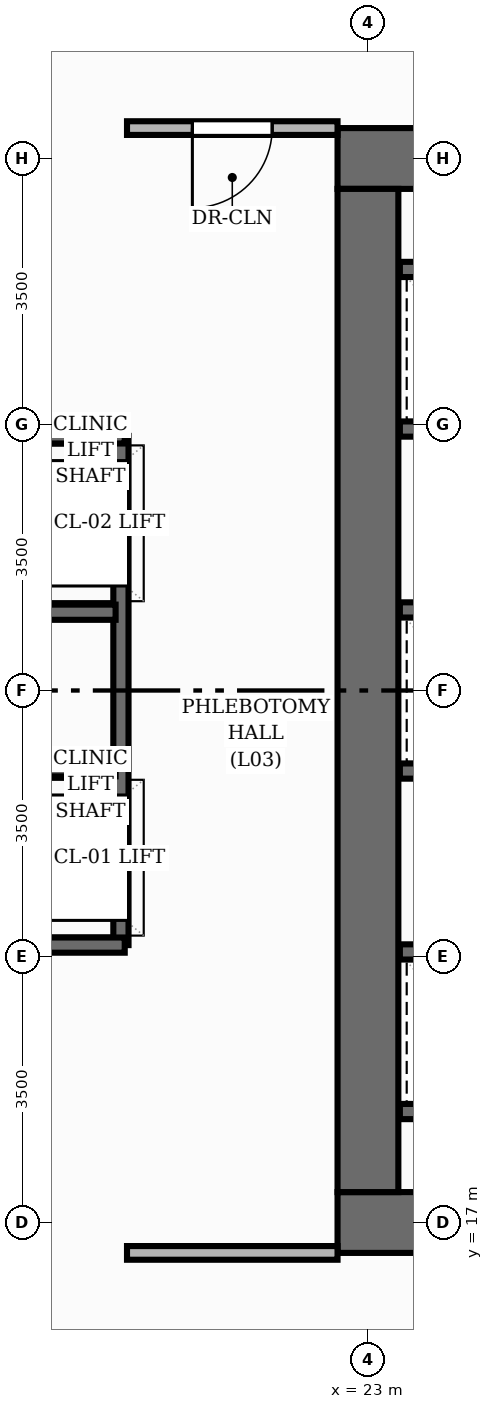
"""IFC4 building model, lengths in metres.
Left out: names, types, materials, properties, quantities, classifications, styles, units other than length and angle.
Written with IfcOpenShell. Run it as: python <this file> out.ifc"""

import sys

from ifc_helpers import new_model, si_unit, direction, frame, frame_2d, origin, place, context, subcontext, project, spatial, rectangle, extrude, element, fill, save


model = new_model("IFC4")
c1 = context("Model", 3, precision=1e-05, world=origin(), true_north=direction((0.0, 1.0)))
c2 = subcontext(c1, "Body", "Model", "MODEL_VIEW")
j1 = project(units=[si_unit("LENGTHUNIT", "METRE"), si_unit("PLANEANGLEUNIT", "RADIAN")], contexts=[c1])
p1 = place(None, origin())
s1 = spatial("IfcSite", under=j1, at=p1, CompositionType="ELEMENT")
p2 = place(p1, origin())
s2 = spatial("IfcBuilding", under=s1, at=p2, CompositionType="ELEMENT")
p3 = place(p2, frame((0.0, 0.0, 12.0)))
s3 = spatial("IfcBuildingStorey", under=s2, at=p3, CompositionType="ELEMENT", Elevation=12.0)
p4 = place(p3, frame((22.6, 17.0, 0.0), z_axis=(0.0, 0.0, 1.0), x_axis=(1.0, 0.0, 0.0)))
e1 = element("IfcWall", 1, at=p4, inside=s3, PredefinedType="SHEAR", context=c2, shape_type="SweptSolid", body=[
    extrude(rectangle(XDim=18.8, YDim=0.8, at=frame_2d((9.4, 0.0))), origin(), (0.0, 0.0, 1.0), 4.0),
])
p5 = place(p4, frame((5.9, 0.0, 0.0)))
e2 = element("IfcOpeningElement", 2, at=p5, cuts=e1, PredefinedType="OPENING", context=c2, shape_type="SweptSolid", body=[
    extrude(rectangle(XDim=1.1, YDim=2.15, at=frame_2d((0.55, 1.075))), frame((0.0, 0.41, 0.0), z_axis=(0.0, -1.0, 0.0), x_axis=(1.0, 0.0, 0.0)), (0.0, 0.0, 1.0), 0.82),
])
p6 = place(p4, frame((9.45, 0.0, 0.0)))
e3 = element("IfcOpeningElement", 3, at=p6, cuts=e1, PredefinedType="OPENING", context=c2, shape_type="SweptSolid", body=[
    extrude(rectangle(XDim=0.9, YDim=2.1, at=frame_2d((0.45, 1.05))), frame((0.0, 0.41, 0.0), z_axis=(0.0, -1.0, 0.0), x_axis=(1.0, 0.0, 0.0)), (0.0, 0.0, 1.0), 0.82),
])
p7 = place(p3, frame((22.6, 31.0, 0.0), z_axis=(0.0, 0.0, 1.0), x_axis=(1.0, 0.0, 0.0)))
e4 = element("IfcWall", 4, at=p7, inside=s3, PredefinedType="SHEAR", context=c2, shape_type="SweptSolid", body=[
    extrude(rectangle(XDim=18.8, YDim=0.8, at=frame_2d((9.4, 0.0))), origin(), (0.0, 0.0, 1.0), 4.0),
])
p8 = place(p7, frame((11.8, 0.0, 0.0)))
e5 = element("IfcOpeningElement", 5, at=p8, cuts=e4, PredefinedType="OPENING", context=c2, shape_type="SweptSolid", body=[
    extrude(rectangle(XDim=1.1, YDim=2.15, at=frame_2d((0.55, 1.075))), frame((0.0, 0.41, 0.0), z_axis=(0.0, -1.0, 0.0), x_axis=(1.0, 0.0, 0.0)), (0.0, 0.0, 1.0), 0.82),
])
p9 = place(p3, frame((23.0, 17.4, 0.0), z_axis=(0.0, 0.0, 1.0), x_axis=(0.0, 1.0, 0.0)))
e6 = element("IfcWall", 6, at=p9, inside=s3, PredefinedType="SHEAR", context=c2, shape_type="SweptSolid", body=[
    extrude(rectangle(XDim=13.2, YDim=0.8, at=frame_2d((6.6, 0.0))), origin(), (0.0, 0.0, 1.0), 4.0),
])
for number, where, z_axis, x_axis in (
    (7, (23.42, 18.46, 0.0), (0.0, 0.0, 1.0), (1.0, 0.0, 0.0)),
    (8, (23.42, 29.54, 0.0), (0.0, 0.0, 1.0), (1.0, 0.0, 0.0)),
    (9, (23.42, 20.56, 0.0), (0.0, 0.0, 1.0), (1.0, 0.0, 0.0)),
    (10, (23.42, 22.94, 0.0), (0.0, 0.0, 1.0), (1.0, 0.0, 0.0)),
    (11, (23.42, 25.06, 0.0), (0.0, 0.0, 1.0), (1.0, 0.0, 0.0)),
    (12, (23.42, 27.44, 0.0), (0.0, 0.0, 1.0), (1.0, 0.0, 0.0)),
):
    element("IfcWall", number, at=place(p3, frame(where, z_axis=z_axis, x_axis=x_axis)), inside=s3, PredefinedType="SHEAR", context=c2, shape_type="SweptSolid", body=[
        extrude(rectangle(XDim=1.71, YDim=0.2, at=frame_2d((0.855, 0.0))), origin(), (0.0, 0.0, 1.0), 4.0),
    ])
p10 = place(p3, frame((19.75, 20.65, 0.0), z_axis=(0.0, 0.0, 1.0), x_axis=(0.0, 1.0, 0.0)))
e13 = element("IfcWall", 13, at=p10, inside=s3, PredefinedType="SHEAR", context=c2, shape_type="SweptSolid", body=[
    extrude(rectangle(XDim=6.7, YDim=0.2, at=frame_2d((3.35, 0.0))), origin(), (0.0, 0.0, 1.0), 4.0),
])
for number, where, z_axis, x_axis in (
    (14, (17.8, 20.65, 0.0), (0.0, 0.0, 1.0), (1.0, 0.0, 0.0)),
    (15, (17.8, 27.35, 0.0), (0.0, 0.0, 1.0), (1.0, 0.0, 0.0)),
):
    element("IfcWall", number, at=place(p3, frame(where, z_axis=z_axis, x_axis=x_axis)), inside=s3, PredefinedType="SHEAR", context=c2, shape_type="SweptSolid", body=[
        extrude(rectangle(XDim=2.0, YDim=0.2, at=frame_2d((1.0, 0.0))), origin(), (0.0, 0.0, 1.0), 4.0),
    ])
for number, where, z_axis, x_axis in (
    (16, (17.92, 22.97, 0.0), (0.0, 0.0, 1.0), (1.0, 0.0, 0.0)),
    (17, (17.92, 25.03, 0.0), (0.0, 0.0, 1.0), (1.0, 0.0, 0.0)),
):
    element("IfcWall", number, at=place(p3, frame(where, z_axis=z_axis, x_axis=x_axis)), inside=s3, PredefinedType="SHEAR", context=c2, shape_type="SweptSolid", body=[
        extrude(rectangle(XDim=1.76, YDim=0.2, at=frame_2d((0.88, 0.0))), origin(), (0.0, 0.0, 1.0), 4.0),
    ])
p11 = place(p3, frame((22.6, 31.4, 0.0), z_axis=(0.0, 0.0, 1.0), x_axis=(-1.0, 0.0, 0.0)))
e18 = element("IfcWall", 18, at=p11, inside=s3, PredefinedType="PARTITIONING", context=c2, shape_type="SweptSolid", body=[
    extrude(rectangle(XDim=2.77, YDim=0.18, at=frame_2d((1.385, 0.0))), origin(), (0.0, 0.0, 1.0), 3.715),
])
p12 = place(p11, frame((0.86, 0.0, 0.0)))
e19 = element("IfcOpeningElement", 19, at=p12, cuts=e18, PredefinedType="OPENING", context=c2, shape_type="SweptSolid", body=[
    extrude(rectangle(XDim=1.05, YDim=2.15, at=frame_2d((0.525, 1.075))), frame((0.0, 0.1, 0.0), z_axis=(0.0, -1.0, 0.0), x_axis=(1.0, 0.0, 0.0)), (0.0, 0.0, 1.0), 0.2),
])
p13 = place(p3, frame((19.83, 16.6, 0.0), z_axis=(0.0, 0.0, 1.0), x_axis=(1.0, 0.0, 0.0)))
e20 = element("IfcWall", 20, at=p13, inside=s3, PredefinedType="PARTITIONING", context=c2, shape_type="SweptSolid", body=[
    extrude(rectangle(XDim=2.77, YDim=0.18, at=frame_2d((1.385, 0.0))), origin(), (0.0, 0.0, 1.0), 3.008),
])
p14 = place(p12, origin())
e21 = element("IfcDoor", 21, at=p14, inside=s3, OperationType="SINGLE_SWING_RIGHT", PredefinedType="DOOR", context=c2, shape_type="SweptSolid", body=[
    extrude(rectangle(XDim=1.05, YDim=2.15, at=frame_2d((0.525, 1.075))), frame((0.0, 0.025, 0.0), z_axis=(0.0, -1.0, 0.0), x_axis=(1.0, 0.0, 0.0)), (0.0, 0.0, 1.0), 0.05),
])
fill(e19, e21)
save(model, sys.argv[1])
